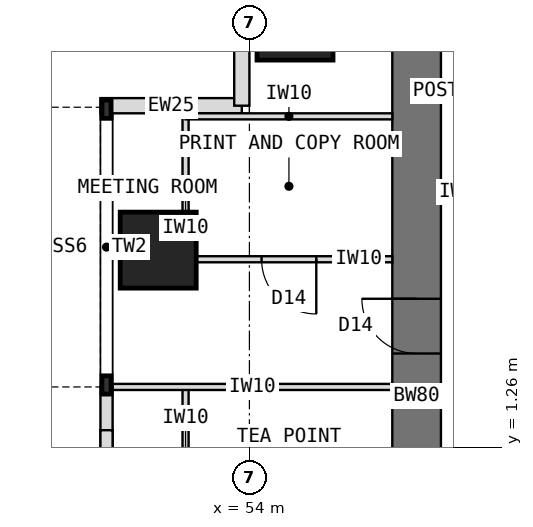
"""IFC4 building model, lengths in metres.
Left out: names, types, materials, properties, quantities, classifications, styles, units other than length and angle.
Written with IfcOpenShell. Run it as: python <this file> out.ifc"""

import sys

from ifc_helpers import new_model, si_unit, direction, frame, frame_2d, origin, origin_2d, place, context, subcontext, project, spatial, rectangle, extrude, element, fill, save


model = new_model("IFC4")
c1 = context("Model", 3, precision=1e-05, world=origin(), true_north=direction((0.0, 1.0)))
c2 = subcontext(c1, "Body", "Model", "MODEL_VIEW")
j1 = project(units=[si_unit("LENGTHUNIT", "METRE"), si_unit("PLANEANGLEUNIT", "RADIAN")], contexts=[c1])
p1 = place(None, origin())
s1 = spatial("IfcSite", under=j1, at=p1, CompositionType="ELEMENT")
p2 = place(p1, origin())
s2 = spatial("IfcBuilding", under=s1, at=p2, CompositionType="ELEMENT")
p3 = place(p2, frame((0.0, 0.0, 161.5)))
s3 = spatial("IfcBuildingStorey", under=s2, at=p3, CompositionType="ELEMENT", Elevation=161.5)
p4 = place(p3, frame((56.75, -4.5, 0.0), z_axis=(0.0, 0.0, 1.0), x_axis=(0.0, 1.0, 0.0)))
e1 = element("IfcWall", 1, at=p4, inside=s3, PredefinedType="SHEAR", context=c2, shape_type="SweptSolid", body=[
    extrude(rectangle(XDim=13.2, YDim=0.8, at=frame_2d((6.6, 0.0))), origin(), (0.0, 0.0, 1.0), 4.0),
])
p5 = place(p4, frame((0.55, 0.0, 0.0)))
e2 = element("IfcOpeningElement", 2, at=p5, cuts=e1, PredefinedType="OPENING", context=c2, shape_type="SweptSolid", body=[
    extrude(rectangle(XDim=0.9, YDim=2.1, at=frame_2d((0.45, 1.05))), frame((0.0, 0.41, 0.0), z_axis=(0.0, -1.0, 0.0), x_axis=(1.0, 0.0, 0.0)), (0.0, 0.0, 1.0), 0.82),
])
p6 = place(p4, frame((2.8, 0.0, 0.0)))
e3 = element("IfcOpeningElement", 3, at=p6, cuts=e1, PredefinedType="OPENING", context=c2, shape_type="SweptSolid", body=[
    extrude(rectangle(XDim=0.9, YDim=2.1, at=frame_2d((0.45, 1.05))), frame((0.0, 0.41, 0.0), z_axis=(0.0, -1.0, 0.0), x_axis=(1.0, 0.0, 0.0)), (0.0, 0.0, 1.0), 0.82),
])
p7 = place(p4, frame((7.3, 0.0, 0.0)))
e4 = element("IfcOpeningElement", 4, at=p7, cuts=e1, PredefinedType="OPENING", context=c2, shape_type="SweptSolid", body=[
    extrude(rectangle(XDim=0.9, YDim=2.1, at=frame_2d((0.45, 1.05))), frame((0.0, 0.41, 0.0), z_axis=(0.0, -1.0, 0.0), x_axis=(1.0, 0.0, 0.0)), (0.0, 0.0, 1.0), 0.82),
])
for number, where, z_axis, x_axis in (
    (5, (52.5, 4.5, 0.0), (0.0, 0.0, 1.0), (1.0, 0.0, 0.0)),
    (6, (54.75, 8.25, 0.0), (0.0, 0.0, 1.0), (1.0, 0.0, 0.0)),
):
    element("IfcColumn", number, at=place(p3, frame(where, z_axis=z_axis, x_axis=x_axis)), inside=s3, PredefinedType="COLUMN", context=c2, shape_type="SweptSolid", body=[
        extrude(rectangle(XDim=1.25, YDim=1.25, at=origin_2d()), origin(), (0.0, 0.0, 1.0), 4.0),
    ])
p8 = place(p3, frame((51.65, 1.539, 0.0), z_axis=(0.0, 0.0, 1.0), x_axis=(0.0, 1.0, 0.0)))
e7 = element("IfcWall", 7, at=p8, inside=s3, PredefinedType="STANDARD", context=c2, shape_type="SweptSolid", body=[
    extrude(rectangle(XDim=0.711, YDim=0.2, at=frame_2d((0.356, 0.0))), origin(), (0.0, 0.0, 1.0), 4.0),
])
p9 = place(p3, frame((51.65, -1.539, 0.0), z_axis=(0.0, 0.0, 1.0), x_axis=(0.0, 1.0, 0.0)))
e8 = element("IfcWall", 8, at=p9, inside=s3, PredefinedType="STANDARD", context=c2, shape_type="SweptSolid", body=[
    extrude(rectangle(XDim=3.077, YDim=0.2, at=frame_2d((1.539, 0.0))), origin(), (0.0, 0.0, 1.0), 1.306),
])
p10 = place(p3, frame((51.65, -1.539, 2.516), z_axis=(0.0, 0.0, 1.0), x_axis=(0.0, 1.0, 0.0)))
e9 = element("IfcWall", 9, at=p10, inside=s3, PredefinedType="STANDARD", context=c2, shape_type="SweptSolid", body=[
    extrude(rectangle(XDim=3.077, YDim=0.2, at=frame_2d((1.539, 0.0))), origin(), (0.0, 0.0, 1.0), 1.484),
])
for number, where, z_axis, x_axis in (
    (10, (51.55, 6.875, 0.0), (0.0, 0.0, 1.0), (1.0, 0.0, 0.0)),
    (11, (53.875, 6.875, 0.0), (0.0, 0.0, 1.0), (0.0, 1.0, 0.0)),
):
    element("IfcWall", number, at=place(p3, frame(where, z_axis=z_axis, x_axis=x_axis)), inside=s3, PredefinedType="STANDARD", context=c2, shape_type="SweptSolid", body=[
        extrude(rectangle(XDim=2.325, YDim=0.25, at=frame_2d((1.163, 0.0))), origin(), (0.0, 0.0, 1.0), 3.7),
    ])
p11 = place(p3, frame((56.35, 2.25, 0.0), z_axis=(0.0, 0.0, 1.0), x_axis=(-1.0, 0.0, 0.0)))
e12 = element("IfcWall", 12, at=p11, inside=s3, PredefinedType="PARTITIONING", context=c2, shape_type="SweptSolid", body=[
    extrude(rectangle(XDim=4.6, YDim=0.1, at=frame_2d((2.3, 0.0))), origin(), (0.0, 0.0, 1.0), 3.7),
])
for number, where, z_axis, x_axis in (
    (13, (52.95, -0.15, 0.0), (0.0, 0.0, 1.0), (0.0, 1.0, 0.0)),
    (14, (52.95, 4.35, 0.0), (0.0, 0.0, 1.0), (0.0, 1.0, 0.0)),
):
    element("IfcWall", number, at=place(p3, frame(where, z_axis=z_axis, x_axis=x_axis)), inside=s3, PredefinedType="PARTITIONING", context=c2, shape_type="SweptSolid", body=[
        extrude(rectangle(XDim=2.4, YDim=0.1, at=frame_2d((1.2, 0.0))), origin(), (0.0, 0.0, 1.0), 3.7),
    ])
p12 = place(p3, frame((56.35, 4.35, 0.0), z_axis=(0.0, 0.0, 1.0), x_axis=(-1.0, 0.0, 0.0)))
e15 = element("IfcWall", 15, at=p12, inside=s3, PredefinedType="PARTITIONING", context=c2, shape_type="SweptSolid", body=[
    extrude(rectangle(XDim=3.4, YDim=0.1, at=frame_2d((1.7, 0.0))), origin(), (0.0, 0.0, 1.0), 3.7),
])
p13 = place(p12, frame((1.25, 0.0, 0.0)))
e16 = element("IfcOpeningElement", 16, at=p13, cuts=e15, PredefinedType="OPENING", context=c2, shape_type="SweptSolid", body=[
    extrude(rectangle(XDim=0.9, YDim=2.1, at=frame_2d((0.45, 1.05))), frame((0.0, 0.06, 0.0), z_axis=(0.0, -1.0, 0.0), x_axis=(1.0, 0.0, 0.0)), (0.0, 0.0, 1.0), 0.12),
])
p14 = place(p3, frame((56.35, 6.7, 0.0), z_axis=(0.0, 0.0, 1.0), x_axis=(-1.0, 0.0, 0.0)))
e17 = element("IfcWall", 17, at=p14, inside=s3, PredefinedType="PARTITIONING", context=c2, shape_type="SweptSolid", body=[
    extrude(rectangle(XDim=3.4, YDim=0.1, at=frame_2d((1.7, 0.0))), origin(), (0.0, 0.0, 1.0), 3.7),
])
p15 = place(p3, frame((59.85, 5.45, 0.0), z_axis=(0.0, 0.0, 1.0), x_axis=(-1.0, 0.0, 0.0)))
e18 = element("IfcWall", 18, at=p15, inside=s3, PredefinedType="PARTITIONING", context=c2, shape_type="SweptSolid", body=[
    extrude(rectangle(XDim=2.7, YDim=0.15, at=frame_2d((1.35, 0.0))), origin(), (0.0, 0.0, 1.0), 3.7),
])
p16 = place(p15, frame((0.85, 0.0, 0.0)))
e19 = element("IfcOpeningElement", 19, at=p16, cuts=e18, PredefinedType="OPENING", context=c2, shape_type="SweptSolid", body=[
    extrude(rectangle(XDim=1.0, YDim=2.1, at=frame_2d((0.5, 1.05))), frame((0.0, 0.085, 0.0), z_axis=(0.0, -1.0, 0.0), x_axis=(1.0, 0.0, 0.0)), (0.0, 0.0, 1.0), 0.17),
])
p17 = place(p13, origin())
e20 = element("IfcDoor", 20, at=p17, inside=s3, OperationType="SINGLE_SWING_LEFT", PredefinedType="DOOR", context=c2, shape_type="SweptSolid", body=[
    extrude(rectangle(XDim=0.9, YDim=2.1, at=frame_2d((0.45, 1.05))), frame((0.0, 0.025, 0.0), z_axis=(0.0, -1.0, 0.0), x_axis=(1.0, 0.0, 0.0)), (0.0, 0.0, 1.0), 0.05),
])
fill(e16, e20)
p18 = place(p7, origin())
e21 = element("IfcDoor", 21, at=p18, inside=s3, OperationType="SINGLE_SWING_RIGHT", PredefinedType="DOOR", context=c2, shape_type="SweptSolid", body=[
    extrude(rectangle(XDim=0.82, YDim=2.06, at=frame_2d((0.45, 1.03))), frame((0.0, 0.025, 0.0), z_axis=(0.0, -1.0, 0.0), x_axis=(1.0, 0.0, 0.0)), (0.0, 0.0, 1.0), 0.05),
    extrude(rectangle(XDim=0.04, YDim=2.1, at=frame_2d((0.02, 1.05))), frame((0.0, 0.4, 0.0), z_axis=(0.0, -1.0, 0.0), x_axis=(1.0, 0.0, 0.0)), (0.0, 0.0, 1.0), 0.8),
    extrude(rectangle(XDim=0.04, YDim=2.1, at=frame_2d((0.88, 1.05))), frame((0.0, 0.4, 0.0), z_axis=(0.0, -1.0, 0.0), x_axis=(1.0, 0.0, 0.0)), (0.0, 0.0, 1.0), 0.8),
    extrude(rectangle(XDim=0.82, YDim=0.04, at=frame_2d((0.45, 2.08))), frame((0.0, 0.4, 0.0), z_axis=(0.0, -1.0, 0.0), x_axis=(1.0, 0.0, 0.0)), (0.0, 0.0, 1.0), 0.8),
])
fill(e4, e21)
save(model, sys.argv[1])
